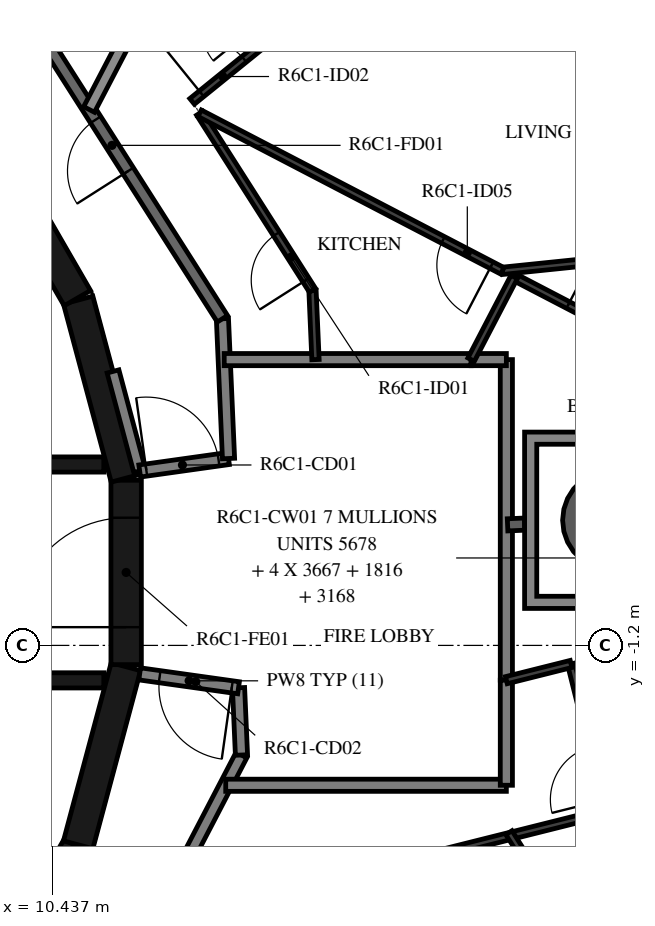
"""IFC4 building model, lengths in metres.
Left out: names, types, materials, properties, quantities, classifications, styles, units other than length and angle.
Written with IfcOpenShell. Run it as: python <this file> out.ifc"""

import sys

from ifc_helpers import new_model, si_unit, direction, frame, frame_2d, origin, origin_2d, place, context, subcontext, project, spatial, polyline, rectangle, hollow_circle, outline, extrude, element, fill, save


model = new_model("IFC4")
c1 = context("Model", 3, precision=1e-05, world=origin(), true_north=direction((0.0, 1.0)))
c2 = subcontext(c1, "Body", "Model", "MODEL_VIEW")
j1 = project(units=[si_unit("LENGTHUNIT", "METRE"), si_unit("PLANEANGLEUNIT", "RADIAN")], contexts=[c1])
p1 = place(None, origin())
s1 = spatial("IfcSite", under=j1, at=p1, CompositionType="ELEMENT")
p2 = place(p1, origin())
s2 = spatial("IfcBuilding", under=s1, at=p2, CompositionType="ELEMENT")
p3 = place(p2, frame((0.0, 0.0, 251.2)))
s3 = spatial("IfcBuildingStorey", under=s2, at=p3, CompositionType="ELEMENT", Elevation=251.2)
p4 = place(p3, frame((19.65, 0.858, -0.38), z_axis=(0.0, 0.0, 1.0), x_axis=(1.0, 0.0, 0.0)))
e1 = element("IfcColumn", 1, at=p4, inside=s3, PredefinedType="COLUMN", context=c2, shape_type="SweptSolid", body=[
    extrude(hollow_circle(Radius=0.825, WallThickness=0.04, at=origin_2d()), origin(), (0.0, 0.0, 1.0), 3.5),
])
for number, where, z_axis, x_axis in (
    (2, (9.329, -7.137, 0.0), (0.0, 0.0, 1.0), (0.5, 0.866, 0.0)),
    (3, (10.858, -4.479, 0.0), (0.0, 0.0, 1.0), (0.259, 0.966, 0.0)),
):
    element("IfcWall", number, at=place(p3, frame(where, z_axis=z_axis, x_axis=x_axis)), inside=s3, PredefinedType="SHEAR", context=c2, shape_type="SweptSolid", body=[
        extrude(rectangle(XDim=3.033, YDim=0.5, at=frame_2d((1.516, 0.0))), origin(), (0.0, 0.0, 1.0), 3.12),
    ])
p5 = place(p3, frame((11.647, -1.516, 0.0), z_axis=(0.0, 0.0, 1.0), x_axis=(0.0, 1.0, 0.0)))
e4 = element("IfcWall", 4, at=p5, inside=s3, PredefinedType="SHEAR", context=c2, shape_type="SweptSolid", body=[
    extrude(rectangle(XDim=3.033, YDim=0.5, at=frame_2d((1.516, 0.0))), origin(), (0.0, 0.0, 1.0), 3.12),
])
p6 = place(p5, frame((0.616, 0.0, 0.0)))
e5 = element("IfcOpeningElement", 5, at=p6, cuts=e4, PredefinedType="OPENING", context=c2, shape_type="SweptSolid", body=[
    extrude(rectangle(XDim=1.8, YDim=2.1, at=frame_2d((0.9, 1.05))), frame((0.0, 0.26, 0.0), z_axis=(0.0, -1.0, 0.0), x_axis=(1.0, 0.0, 0.0)), (0.0, 0.0, 1.0), 0.52),
])
for number, where, z_axis, x_axis in (
    (6, (11.643, 1.55, 0.0), (0.0, 0.0, 1.0), (-0.259, 0.966, 0.0)),
    (7, (10.845, 4.51, 0.0), (0.0, 0.0, 1.0), (-0.5, 0.866, 0.0)),
):
    element("IfcWall", number, at=place(p3, frame(where, z_axis=z_axis, x_axis=x_axis)), inside=s3, PredefinedType="SHEAR", context=c2, shape_type="SweptSolid", body=[
        extrude(rectangle(XDim=3.033, YDim=0.5, at=frame_2d((1.516, 0.0))), origin(), (0.0, 0.0, 1.0), 3.12),
    ])
p7 = place(p3, frame((3.35, 1.775, 0.0), z_axis=(0.0, 0.0, 1.0), x_axis=(1.0, 0.0, 0.0)))
e8 = element("IfcWall", 8, at=p7, inside=s3, PredefinedType="SHEAR", context=c2, shape_type="SweptSolid", body=[
    extrude(rectangle(XDim=7.93, YDim=0.25, at=frame_2d((3.965, 0.0))), origin(), (0.0, 0.0, 1.0), 3.12),
])
p8 = place(p7, frame((0.35, 0.0, 0.0)))
e9 = element("IfcOpeningElement", 9, at=p8, cuts=e8, PredefinedType="OPENING", context=c2, shape_type="SweptSolid", body=[
    extrude(rectangle(XDim=1.2, YDim=2.4, at=frame_2d((0.6, 1.2))), frame((0.0, 0.135, 0.0), z_axis=(0.0, -1.0, 0.0), x_axis=(1.0, 0.0, 0.0)), (0.0, 0.0, 1.0), 0.27),
])
p9 = place(p7, frame((2.5, 0.0, 0.0)))
e10 = element("IfcOpeningElement", 10, at=p9, cuts=e8, PredefinedType="OPENING", context=c2, shape_type="SweptSolid", body=[
    extrude(rectangle(XDim=1.2, YDim=2.4, at=frame_2d((0.6, 1.2))), frame((0.0, 0.135, 0.0), z_axis=(0.0, -1.0, 0.0), x_axis=(1.0, 0.0, 0.0)), (0.0, 0.0, 1.0), 0.27),
])
p10 = place(p7, frame((4.8, 0.0, 0.0)))
e11 = element("IfcOpeningElement", 11, at=p10, cuts=e8, PredefinedType="OPENING", context=c2, shape_type="SweptSolid", body=[
    extrude(rectangle(XDim=0.9, YDim=2.1, at=frame_2d((0.45, 1.05))), frame((0.0, 0.135, 0.0), z_axis=(0.0, -1.0, 0.0), x_axis=(1.0, 0.0, 0.0)), (0.0, 0.0, 1.0), 0.27),
])
p11 = place(p3, frame((3.35, -1.775, 0.0), z_axis=(0.0, 0.0, 1.0), x_axis=(1.0, 0.0, 0.0)))
e12 = element("IfcWall", 12, at=p11, inside=s3, PredefinedType="SHEAR", context=c2, shape_type="SweptSolid", body=[
    extrude(rectangle(XDim=7.93, YDim=0.25, at=frame_2d((3.965, 0.0))), origin(), (0.0, 0.0, 1.0), 3.12),
])
p12 = place(p11, frame((0.4, 0.0, 0.0)))
e13 = element("IfcOpeningElement", 13, at=p12, cuts=e12, PredefinedType="OPENING", context=c2, shape_type="SweptSolid", body=[
    extrude(rectangle(XDim=1.1, YDim=2.4, at=frame_2d((0.55, 1.2))), frame((0.0, 0.135, 0.0), z_axis=(0.0, -1.0, 0.0), x_axis=(1.0, 0.0, 0.0)), (0.0, 0.0, 1.0), 0.27),
])
p13 = place(p11, frame((2.55, 0.0, 0.0)))
e14 = element("IfcOpeningElement", 14, at=p13, cuts=e12, PredefinedType="OPENING", context=c2, shape_type="SweptSolid", body=[
    extrude(rectangle(XDim=1.1, YDim=2.4, at=frame_2d((0.55, 1.2))), frame((0.0, 0.135, 0.0), z_axis=(0.0, -1.0, 0.0), x_axis=(1.0, 0.0, 0.0)), (0.0, 0.0, 1.0), 0.27),
])
p14 = place(p11, frame((4.7, 0.0, 0.0)))
e15 = element("IfcOpeningElement", 15, at=p14, cuts=e12, PredefinedType="OPENING", context=c2, shape_type="SweptSolid", body=[
    extrude(rectangle(XDim=1.1, YDim=2.4, at=frame_2d((0.55, 1.2))), frame((0.0, 0.135, 0.0), z_axis=(0.0, -1.0, 0.0), x_axis=(1.0, 0.0, 0.0)), (0.0, 0.0, 1.0), 0.27),
])
p15 = place(p3, frame((11.87, 1.668, 0.0), z_axis=(0.0, 0.0, 1.0), x_axis=(-0.258836880648, 0.965921047093, 0.0)))
e16 = element("IfcWall", 16, at=p15, inside=s3, PredefinedType="STANDARD", context=c2, shape_type="SweptSolid", body=[
    extrude(rectangle(XDim=1.695, YDim=0.2, at=frame_2d((0.848, 0.0))), origin(), (0.0, 0.0, 1.0), 3.12),
])
p16 = place(p3, frame((11.87, 1.668, 0.0), z_axis=(0.0, 0.0, 1.0), x_axis=(0.990267985606, 0.139173692496, 0.0)))
e17 = element("IfcWall", 17, at=p16, inside=s3, PredefinedType="STANDARD", context=c2, shape_type="SweptSolid", body=[
    extrude(rectangle(XDim=1.475, YDim=0.2, at=frame_2d((0.738, 0.0))), origin(), (0.0, 0.0, 1.0), 3.12),
])
p17 = place(p16, frame((0.11, 0.0, 0.0)))
e18 = element("IfcOpeningElement", 18, at=p17, cuts=e17, PredefinedType="OPENING", context=c2, shape_type="SweptSolid", body=[
    extrude(rectangle(XDim=1.2, YDim=2.1, at=frame_2d((0.6, 1.05))), frame((0.0, 0.11, 0.0), z_axis=(0.0, -1.0, 0.0), x_axis=(1.0, 0.0, 0.0)), (0.0, 0.0, 1.0), 0.22),
])
p18 = place(p3, frame((13.331, 1.874, 0.0), z_axis=(0.0, 0.0, 1.0), x_axis=(-0.043621457762, 0.999048131184, 0.0)))
e19 = element("IfcWall", 19, at=p18, inside=s3, PredefinedType="STANDARD", context=c2, shape_type="SweptSolid", body=[
    extrude(rectangle(XDim=2.3, YDim=0.2, at=frame_2d((1.15, 0.0))), origin(), (0.0, 0.0, 1.0), 3.12),
])
p19 = place(p3, frame((13.231, 4.172, 0.0), z_axis=(0.0, 0.0, 1.0), x_axis=(-0.537304397561, 0.843388394728, 0.0)))
e20 = element("IfcWall", 20, at=p19, inside=s3, PredefinedType="STANDARD", context=c2, shape_type="SweptSolid", body=[
    extrude(rectangle(XDim=7.181, YDim=0.2, at=frame_2d((3.59, 0.0))), origin(), (0.0, 0.0, 1.0), 3.12),
])
p20 = place(p19, frame((2.881, 0.0, 0.0)))
e21 = element("IfcOpeningElement", 21, at=p20, cuts=e20, PredefinedType="OPENING", context=c2, shape_type="SweptSolid", body=[
    extrude(rectangle(XDim=1.0, YDim=2.1, at=frame_2d((0.5, 1.05))), frame((0.0, 0.11, 0.0), z_axis=(0.0, -1.0, 0.0), x_axis=(1.0, 0.0, 0.0)), (0.0, 0.0, 1.0), 0.22),
])
p21 = place(p19, frame((5.681, 0.0, 0.0)))
e22 = element("IfcOpeningElement", 22, at=p21, cuts=e20, PredefinedType="OPENING", context=c2, shape_type="SweptSolid", body=[
    extrude(rectangle(XDim=1.0, YDim=2.1, at=frame_2d((0.5, 1.05))), frame((0.0, 0.11, 0.0), z_axis=(0.0, -1.0, 0.0), x_axis=(1.0, 0.0, 0.0)), (0.0, 0.0, 1.0), 0.22),
])
p22 = place(p3, frame((10.228, -9.372, 0.0), z_axis=(0.0, 0.0, 1.0), x_axis=(0.461759464021, 0.887005184532, 0.0)))
e23 = element("IfcWall", 23, at=p22, inside=s3, PredefinedType="STANDARD", context=c2, shape_type="SweptSolid", body=[
    extrude(rectangle(XDim=7.181, YDim=0.2, at=frame_2d((3.591, 0.0))), origin(), (0.0, 0.0, 1.0), 3.12),
])
p23 = place(p3, frame((13.544, -3.003, 0.0), z_axis=(0.0, 0.0, 1.0), x_axis=(-0.043666917606, 0.999046145234, 0.0)))
e24 = element("IfcWall", 24, at=p23, inside=s3, PredefinedType="STANDARD", context=c2, shape_type="SweptSolid", body=[
    extrude(rectangle(XDim=1.107, YDim=0.2, at=frame_2d((0.553, 0.0))), origin(), (0.0, 0.0, 1.0), 3.12),
])
p24 = place(p3, frame((13.496, -1.897, 0.0), z_axis=(0.0, 0.0, 1.0), x_axis=(-0.99026234641, 0.139213811391, 0.0)))
e25 = element("IfcWall", 25, at=p24, inside=s3, PredefinedType="STANDARD", context=c2, shape_type="SweptSolid", body=[
    extrude(rectangle(XDim=1.641, YDim=0.2, at=frame_2d((0.821, 0.0))), origin(), (0.0, 0.0, 1.0), 3.12),
])
p25 = place(p24, frame((0.11, 0.0, 0.0)))
e26 = element("IfcOpeningElement", 26, at=p25, cuts=e25, PredefinedType="OPENING", context=c2, shape_type="SweptSolid", body=[
    extrude(rectangle(XDim=1.2, YDim=2.1, at=frame_2d((0.6, 1.05))), frame((0.0, 0.11, 0.0), z_axis=(0.0, -1.0, 0.0), x_axis=(1.0, 0.0, 0.0)), (0.0, 0.0, 1.0), 0.22),
])
p26 = place(p3, frame((17.321, 3.5, 0.0), z_axis=(0.0, 0.0, 1.0), x_axis=(-1.0, 0.0, 0.0)))
e27 = element("IfcWall", 27, at=p26, inside=s3, PredefinedType="STANDARD", context=c2, shape_type="SweptSolid", body=[
    extrude(rectangle(XDim=4.061, YDim=0.2, at=frame_2d((2.03, 0.0))), origin(), (0.0, 0.0, 1.0), 3.12),
])
p27 = place(p3, frame((17.9, -1.772, 0.0), z_axis=(0.0, 0.0, 1.0), x_axis=(0.0, 1.0, 0.0)))
e28 = element("IfcWall", 28, at=p27, inside=s3, PredefinedType="STANDARD", context=c2, shape_type="SweptSolid", body=[
    extrude(rectangle(XDim=5.272, YDim=0.2, at=frame_2d((2.636, 0.0))), origin(), (0.0, 0.0, 1.0), 3.12),
])
p28 = place(p3, frame((17.9, 3.5, 0.0), z_axis=(0.0, 0.0, 1.0), x_axis=(-1.0, 0.0, 0.0)))
e29 = element("IfcWall", 29, at=p28, inside=s3, PredefinedType="STANDARD", context=c2, shape_type="SweptSolid", body=[
    extrude(rectangle(XDim=0.579, YDim=0.2, at=frame_2d((0.29, 0.0))), origin(), (0.0, 0.0, 1.0), 3.12),
])
p29 = place(p3, frame((13.285, -3.5, 0.0), z_axis=(0.0, 0.0, 1.0), x_axis=(1.0, 0.0, 0.0)))
e30 = element("IfcWall", 30, at=p29, inside=s3, PredefinedType="STANDARD", context=c2, shape_type="SweptSolid", body=[
    extrude(rectangle(XDim=4.615, YDim=0.2, at=frame_2d((2.308, 0.0))), origin(), (0.0, 0.0, 1.0), 3.12),
])
p30 = place(p3, frame((17.9, -3.5, 0.0), z_axis=(0.0, 0.0, 1.0), x_axis=(0.0, 1.0, 0.0)))
e31 = element("IfcWall", 31, at=p30, inside=s3, PredefinedType="STANDARD", context=c2, shape_type="SweptSolid", body=[
    extrude(rectangle(XDim=1.728, YDim=0.2, at=frame_2d((0.864, 0.0))), origin(), (0.0, 0.0, 1.0), 3.12),
])
p31 = place(p3, frame((13.801, 12.922, 0.0), z_axis=(0.0, 0.0, 1.0), x_axis=(-0.461726485624, -0.887022351733, 0.0)))
e32 = element("IfcWall", 32, at=p31, inside=s3, PredefinedType="STANDARD", context=c2, shape_type="SweptSolid", body=[
    extrude(rectangle(XDim=5.984, YDim=0.2, at=frame_2d((2.992, 0.0))), origin(), (0.0, 0.0, 1.0), 2.73),
])
p32 = place(p3, frame((17.92, 0.782, 0.0), z_axis=(0.0, 0.0, 1.0), x_axis=(0.999051221661, 0.04355061995, 0.0)))
e33 = element("IfcWall", 33, at=p32, inside=s3, PredefinedType="STANDARD", context=c2, shape_type="SweptSolid", body=[
    extrude(rectangle(XDim=0.28, YDim=0.2, at=frame_2d((0.14, 0.0))), origin(), (0.0, 0.0, 1.0), 3.12),
])
p33 = place(p3, frame((14.761, 3.5, 0.0), z_axis=(0.0, 0.0, 1.0), x_axis=(-0.04369750018, 0.999044808043, 0.0)))
e34 = element("IfcWall", 34, at=p33, inside=s3, PredefinedType="PARTITIONING", context=c2, shape_type="SweptSolid", body=[
    extrude(rectangle(XDim=1.14, YDim=0.12, at=frame_2d((0.57, 0.0))), origin(), (0.0, 0.0, 1.0), 3.12),
])
p34 = place(p3, frame((14.712, 4.639, 0.0), z_axis=(0.0, 0.0, 1.0), x_axis=(-0.537287126609, 0.843399397427, 0.0)))
e35 = element("IfcWall", 35, at=p34, inside=s3, PredefinedType="PARTITIONING", context=c2, shape_type="SweptSolid", body=[
    extrude(rectangle(XDim=3.453, YDim=0.12, at=frame_2d((1.727, 0.0))), origin(), (0.0, 0.0, 1.0), 3.12),
])
p35 = place(p34, frame((0.2, 0.0, 0.0)))
e36 = element("IfcOpeningElement", 36, at=p35, cuts=e35, PredefinedType="OPENING", context=c2, shape_type="SweptSolid", body=[
    extrude(rectangle(XDim=0.9, YDim=2.1, at=frame_2d((0.45, 1.05))), frame((0.0, 0.07, 0.0), z_axis=(0.0, -1.0, 0.0), x_axis=(1.0, 0.0, 0.0)), (0.0, 0.0, 1.0), 0.14),
])
p36 = place(p3, frame((12.732, 7.746, 0.0), z_axis=(0.0, 0.0, 1.0), x_axis=(0.777187694298, 0.62926885179, 0.0)))
e37 = element("IfcWall", 37, at=p36, inside=s3, PredefinedType="PARTITIONING", context=c2, shape_type="SweptSolid", body=[
    extrude(rectangle(XDim=1.591, YDim=0.12, at=frame_2d((0.795, 0.0))), origin(), (0.0, 0.0, 1.0), 3.12),
])
p37 = place(p36, frame((0.2, 0.0, 0.0)))
e38 = element("IfcOpeningElement", 38, at=p37, cuts=e37, PredefinedType="OPENING", context=c2, shape_type="SweptSolid", body=[
    extrude(rectangle(XDim=0.9, YDim=2.1, at=frame_2d((0.45, 1.05))), frame((0.0, 0.07, 0.0), z_axis=(0.0, -1.0, 0.0), x_axis=(1.0, 0.0, 0.0)), (0.0, 0.0, 1.0), 0.14),
])
p38 = place(p3, frame((18.028, 4.859, 0.0), z_axis=(0.0, 0.0, 1.0), x_axis=(0.88702512027, -0.46172116695, 0.0)))
e39 = element("IfcWall", 39, at=p38, inside=s3, PredefinedType="PARTITIONING", context=c2, shape_type="SweptSolid", body=[
    extrude(rectangle(XDim=2.983, YDim=0.12, at=frame_2d((1.492, 0.0))), origin(), (0.0, 0.0, 1.0), 3.12),
])
p39 = place(p38, frame((1.0, 0.0, 0.0)))
e40 = element("IfcOpeningElement", 40, at=p39, cuts=e39, PredefinedType="OPENING", context=c2, shape_type="SweptSolid", body=[
    extrude(rectangle(XDim=0.8, YDim=2.1, at=frame_2d((0.4, 1.05))), frame((0.0, 0.07, 0.0), z_axis=(0.0, -1.0, 0.0), x_axis=(1.0, 0.0, 0.0)), (0.0, 0.0, 1.0), 0.14),
])
p40 = place(p3, frame((25.908, 5.79, 0.0), z_axis=(0.0, 0.0, 1.0), x_axis=(-0.994752982456, -0.102305932847, 0.0)))
e41 = element("IfcWall", 41, at=p40, inside=s3, PredefinedType="PARTITIONING", context=c2, shape_type="SweptSolid", body=[
    extrude(rectangle(XDim=8.116, YDim=0.12, at=frame_2d((4.058, 0.0))), origin(), (0.0, 0.0, 1.0), 3.12),
])
p41 = place(p40, frame((0.6, 0.0, 0.0)))
e42 = element("IfcOpeningElement", 42, at=p41, cuts=e41, PredefinedType="OPENING", context=c2, shape_type="SweptSolid", body=[
    extrude(rectangle(XDim=0.9, YDim=2.1, at=frame_2d((0.45, 1.05))), frame((0.0, 0.07, 0.0), z_axis=(0.0, -1.0, 0.0), x_axis=(1.0, 0.0, 0.0)), (0.0, 0.0, 1.0), 0.14),
])
p42 = place(p3, frame((18.028, 4.859, 0.0), z_axis=(0.0, 0.0, 1.0), x_axis=(-0.461688901614, -0.887041914526, 0.0)))
e43 = element("IfcWall", 43, at=p42, inside=s3, PredefinedType="PARTITIONING", context=c2, shape_type="SweptSolid", body=[
    extrude(rectangle(XDim=1.532, YDim=0.12, at=frame_2d((0.766, 0.0))), origin(), (0.0, 0.0, 1.0), 3.12),
])
p43 = place(p3, frame((17.834, 4.96, 0.0), z_axis=(0.0, 0.0, 1.0), x_axis=(-0.887008743782, 0.461752626906, 0.0)))
e44 = element("IfcWall", 44, at=p43, inside=s3, PredefinedType="PARTITIONING", context=c2, shape_type="SweptSolid", body=[
    extrude(rectangle(XDim=5.612, YDim=0.12, at=frame_2d((2.806, 0.0))), origin(), (0.0, 0.0, 1.0), 3.12),
])
p44 = place(p43, frame((0.2, 0.0, 0.0)))
e45 = element("IfcOpeningElement", 45, at=p44, cuts=e44, PredefinedType="OPENING", context=c2, shape_type="SweptSolid", body=[
    extrude(rectangle(XDim=0.9, YDim=2.1, at=frame_2d((0.45, 1.05))), frame((0.0, 0.07, 0.0), z_axis=(0.0, -1.0, 0.0), x_axis=(1.0, 0.0, 0.0)), (0.0, 0.0, 1.0), 0.14),
])
p45 = place(p3, frame((14.029, -5.32, 0.0), z_axis=(0.0, 0.0, 1.0), x_axis=(0.969999099814, 0.243108507378, 0.0)))
e46 = element("IfcWall", 46, at=p45, inside=s3, PredefinedType="PARTITIONING", context=c2, shape_type="SweptSolid", body=[
    extrude(rectangle(XDim=5.715, YDim=0.12, at=frame_2d((2.857, 0.0))), origin(), (0.0, 0.0, 1.0), 3.12),
])
p46 = place(p3, frame((19.573, -3.93, 0.0), z_axis=(0.0, 0.0, 1.0), x_axis=(-0.243155959183, 0.96998720585, 0.0)))
e47 = element("IfcWall", 47, at=p46, inside=s3, PredefinedType="PARTITIONING", context=c2, shape_type="SweptSolid", body=[
    extrude(rectangle(XDim=2.5, YDim=0.12, at=frame_2d((1.25, 0.0))), origin(), (0.0, 0.0, 1.0), 3.12),
])
p47 = place(p46, frame((0.2, 0.0, 0.0)))
e48 = element("IfcOpeningElement", 48, at=p47, cuts=e47, PredefinedType="OPENING", context=c2, shape_type="SweptSolid", body=[
    extrude(rectangle(XDim=0.9, YDim=2.1, at=frame_2d((0.45, 1.05))), frame((0.0, 0.07, 0.0), z_axis=(0.0, -1.0, 0.0), x_axis=(1.0, 0.0, 0.0)), (0.0, 0.0, 1.0), 0.14),
])
p48 = place(p3, frame((18.965, -1.505, 0.0), z_axis=(0.0, 0.0, 1.0), x_axis=(-0.969998406835, -0.243111272339, 0.0)))
e49 = element("IfcWall", 49, at=p48, inside=s3, PredefinedType="PARTITIONING", context=c2, shape_type="SweptSolid", body=[
    extrude(rectangle(XDim=1.098, YDim=0.12, at=frame_2d((0.549, 0.0))), origin(), (0.0, 0.0, 1.0), 3.12),
])
p49 = place(p3, frame((21.837, -2.966, 0.0), z_axis=(0.0, 0.0, 1.0), x_axis=(-0.843394529709, -0.537294767569, 0.0)))
e50 = element("IfcWall", 50, at=p49, inside=s3, PredefinedType="PARTITIONING", context=c2, shape_type="SweptSolid", body=[
    extrude(rectangle(XDim=11.678, YDim=0.12, at=frame_2d((5.839, 0.0))), origin(), (0.0, 0.0, 1.0), 3.12),
])
p50 = place(p49, frame((0.2, 0.0, 0.0)))
e51 = element("IfcOpeningElement", 51, at=p50, cuts=e50, PredefinedType="OPENING", context=c2, shape_type="SweptSolid", body=[
    extrude(rectangle(XDim=0.9, YDim=2.1, at=frame_2d((0.45, 1.05))), frame((0.0, 0.07, 0.0), z_axis=(0.0, -1.0, 0.0), x_axis=(1.0, 0.0, 0.0)), (0.0, 0.0, 1.0), 0.14),
])
p51 = place(p3, frame((18.503, -5.161, 0.0), z_axis=(0.0, 0.0, 1.0), x_axis=(-0.537208231854, 0.843449652101, 0.0)))
e52 = element("IfcWall", 52, at=p51, inside=s3, PredefinedType="PARTITIONING", context=c2, shape_type="SweptSolid", body=[
    extrude(rectangle(XDim=1.044, YDim=0.12, at=frame_2d((0.522, 0.0))), origin(), (0.0, 0.0, 1.0), 3.12),
])
p52 = place(p3, origin())
e53 = element("IfcWall", 53, at=p52, inside=s3, PredefinedType="STANDARD", context=c2, shape_type="SweptSolid", body=[
    extrude(outline(polyline([(21.1, 2.308), (21.1, -0.592), (18.2, -0.592), (18.2, 2.308), (21.1, 2.308)]), holes=[polyline([(18.4, -0.392), (20.9, -0.392), (20.9, 2.108), (18.4, 2.108), (18.4, -0.392)])]), origin(), (0.0, 0.0, 1.0), 3.12),
])
p53 = place(p6, origin())
e54 = element("IfcDoor", 54, at=p53, inside=s3, OperationType="DOUBLE_DOOR_SINGLE_SWING", PredefinedType="DOOR", context=c2, shape_type="SweptSolid", body=[
    extrude(rectangle(XDim=1.8, YDim=2.1, at=frame_2d((0.9, 1.05))), frame((0.0, 0.025, 0.0), z_axis=(0.0, -1.0, 0.0), x_axis=(1.0, 0.0, 0.0)), (0.0, 0.0, 1.0), 0.05),
])
fill(e5, e54)
p54 = place(p20, origin())
e55 = element("IfcDoor", 55, at=p54, inside=s3, OperationType="SINGLE_SWING_LEFT", PredefinedType="DOOR", context=c2, shape_type="SweptSolid", body=[
    extrude(rectangle(XDim=1.0, YDim=2.1, at=frame_2d((0.5, 1.05))), frame((0.0, 0.025, 0.0), z_axis=(0.0, -1.0, 0.0), x_axis=(1.0, 0.0, 0.0)), (0.0, 0.0, 1.0), 0.05),
])
fill(e21, e55)
p55 = place(p35, origin())
e56 = element("IfcDoor", 56, at=p55, inside=s3, OperationType="SINGLE_SWING_LEFT", PredefinedType="DOOR", context=c2, shape_type="SweptSolid", body=[
    extrude(rectangle(XDim=0.9, YDim=2.1, at=frame_2d((0.45, 1.05))), frame((0.0, 0.025, 0.0), z_axis=(0.0, -1.0, 0.0), x_axis=(1.0, 0.0, 0.0)), (0.0, 0.0, 1.0), 0.05),
])
fill(e36, e56)
p56 = place(p37, origin())
e57 = element("IfcDoor", 57, at=p56, inside=s3, OperationType="SINGLE_SWING_RIGHT", PredefinedType="DOOR", context=c2, shape_type="SweptSolid", body=[
    extrude(rectangle(XDim=0.9, YDim=2.1, at=frame_2d((0.45, 1.05))), frame((0.0, 0.025, 0.0), z_axis=(0.0, -1.0, 0.0), x_axis=(1.0, 0.0, 0.0)), (0.0, 0.0, 1.0), 0.05),
])
fill(e38, e57)
p57 = place(p39, origin())
e58 = element("IfcDoor", 58, at=p57, inside=s3, OperationType="SINGLE_SWING_RIGHT", PredefinedType="DOOR", context=c2, shape_type="SweptSolid", body=[
    extrude(rectangle(XDim=0.8, YDim=2.1, at=frame_2d((0.4, 1.05))), frame((0.0, 0.025, 0.0), z_axis=(0.0, -1.0, 0.0), x_axis=(1.0, 0.0, 0.0)), (0.0, 0.0, 1.0), 0.05),
])
fill(e40, e58)
p58 = place(p44, origin())
e59 = element("IfcDoor", 59, at=p58, inside=s3, OperationType="SINGLE_SWING_RIGHT", PredefinedType="DOOR", context=c2, shape_type="SweptSolid", body=[
    extrude(rectangle(XDim=0.9, YDim=2.1, at=frame_2d((0.45, 1.05))), frame((0.0, 0.025, 0.0), z_axis=(0.0, -1.0, 0.0), x_axis=(1.0, 0.0, 0.0)), (0.0, 0.0, 1.0), 0.05),
])
fill(e45, e59)
p59 = place(p17, origin())
e60 = element("IfcDoor", 60, at=p59, inside=s3, OperationType="DOUBLE_DOOR_SINGLE_SWING", PredefinedType="DOOR", context=c2, shape_type="SweptSolid", body=[
    extrude(rectangle(XDim=1.2, YDim=2.1, at=frame_2d((0.6, 1.05))), frame((0.0, 0.025, 0.0), z_axis=(0.0, -1.0, 0.0), x_axis=(1.0, 0.0, 0.0)), (0.0, 0.0, 1.0), 0.05),
])
fill(e18, e60)
p60 = place(p25, origin())
e61 = element("IfcDoor", 61, at=p60, inside=s3, OperationType="DOUBLE_DOOR_SINGLE_SWING", PredefinedType="DOOR", context=c2, shape_type="SweptSolid", body=[
    extrude(rectangle(XDim=1.2, YDim=2.1, at=frame_2d((0.6, 1.05))), frame((0.0, 0.025, 0.0), z_axis=(0.0, -1.0, 0.0), x_axis=(1.0, 0.0, 0.0)), (0.0, 0.0, 1.0), 0.05),
])
fill(e26, e61)
save(model, sys.argv[1])
